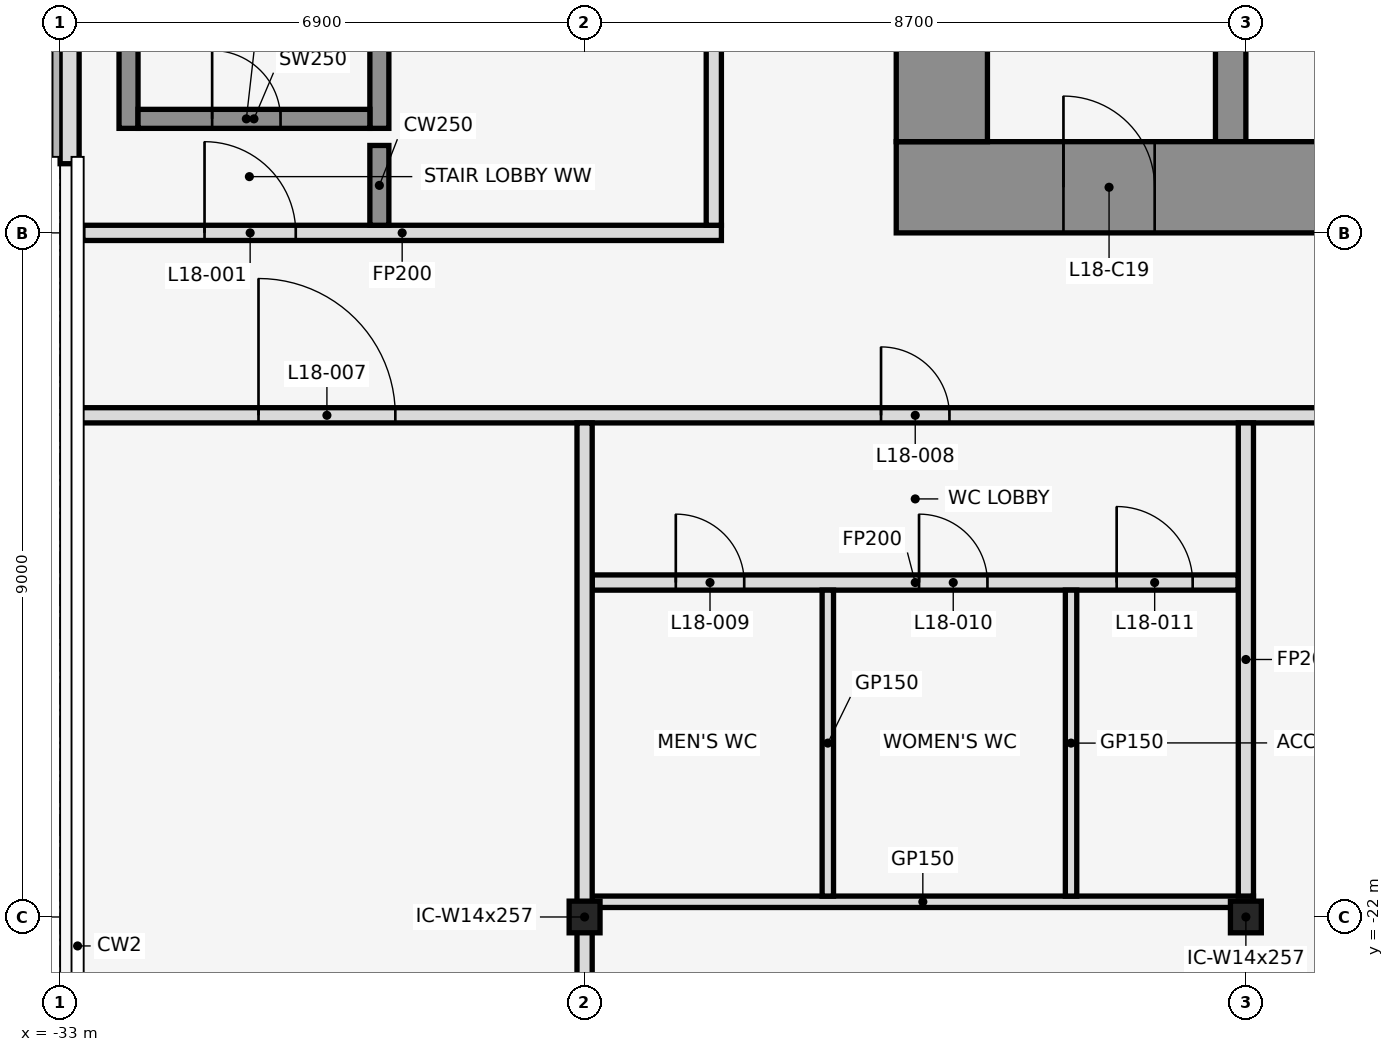
"""IFC4 building model, lengths in metres.
Left out: names, types, materials, properties, quantities, classifications, styles, units other than length and angle.
Written with IfcOpenShell. Run it as: python <this file> out.ifc"""

import sys

from ifc_helpers import new_model, si_unit, direction, frame, frame_2d, origin, origin_2d, place, context, subcontext, project, spatial, rectangle, i_section, extrude, element, fill, save


model = new_model("IFC4")
c1 = context("Model", 3, precision=1e-05, world=origin(), true_north=direction((0.0, 1.0)))
c2 = subcontext(c1, "Body", "Model", "MODEL_VIEW")
j1 = project(units=[si_unit("LENGTHUNIT", "METRE"), si_unit("PLANEANGLEUNIT", "RADIAN")], contexts=[c1])
p1 = place(None, origin())
s1 = spatial("IfcSite", under=j1, at=p1, CompositionType="ELEMENT")
p2 = place(p1, origin())
s2 = spatial("IfcBuilding", under=s1, at=p2, CompositionType="ELEMENT")
p3 = place(p2, frame((0.0, 0.0, 89.9)))
s3 = spatial("IfcBuildingStorey", under=s2, at=p3, CompositionType="ELEMENT", Elevation=89.9)
for number, where, z_axis, x_axis in (
    (1, (-26.1, -22.0, 0.0), (0.0, 0.0, 1.0), (1.0, 0.0, 0.0)),
    (2, (-17.4, -22.0, 0.0), (0.0, 0.0, 1.0), (1.0, 0.0, 0.0)),
):
    element("IfcColumn", number, at=place(p3, frame(where, z_axis=z_axis, x_axis=x_axis)), inside=s3, PredefinedType="COLUMN", context=c2, shape_type="SweptSolid", body=[
        extrude(i_section(OverallWidth=0.406, OverallDepth=0.417, WebThickness=0.03, FlangeThickness=0.048, at=origin_2d()), origin(), (0.0, 0.0, 1.0), 4.1),
    ])
p4 = place(p3, frame((-32.875, -6.0, 0.0), z_axis=(0.0, 0.0, 1.0), x_axis=(0.0, -1.0, 0.0)))
e3 = element("IfcWall", 3, at=p4, inside=s3, PredefinedType="STANDARD", context=c2, shape_type="SweptSolid", body=[
    extrude(rectangle(XDim=6.09, YDim=0.25, at=frame_2d((3.045, 0.0))), origin(), (0.0, 0.0, 1.0), 3.95),
])
for number, where, z_axis, x_axis in (
    (4, (-32.1, -11.625, 0.0), (0.0, 0.0, 1.0), (0.0, 1.0, 0.0)),
    (5, (-28.8, -11.625, 0.0), (0.0, 0.0, 1.0), (0.0, 1.0, 0.0)),
):
    element("IfcWall", number, at=place(p3, frame(where, z_axis=z_axis, x_axis=x_axis)), inside=s3, PredefinedType="SHEAR", context=c2, shape_type="SweptSolid", body=[
        extrude(rectangle(XDim=7.25, YDim=0.25, at=frame_2d((3.625, 0.0))), origin(), (0.0, 0.0, 1.0), 4.1),
    ])
p5 = place(p3, frame((-31.975, -11.5, 0.0), z_axis=(0.0, 0.0, 1.0), x_axis=(1.0, 0.0, 0.0)))
e6 = element("IfcWall", 6, at=p5, inside=s3, PredefinedType="SHEAR", context=c2, shape_type="SweptSolid", body=[
    extrude(rectangle(XDim=3.05, YDim=0.25, at=frame_2d((1.525, 0.0))), origin(), (0.0, 0.0, 1.0), 4.1),
])
p6 = place(p5, frame((0.975, 0.0, 0.0)))
e7 = element("IfcOpeningElement", 7, at=p6, cuts=e6, PredefinedType="OPENING", context=c2, shape_type="SweptSolid", body=[
    extrude(rectangle(XDim=0.9, YDim=2.1, at=frame_2d((0.45, 1.05))), frame((0.0, 0.137, 0.0), z_axis=(0.0, -1.0, 0.0), x_axis=(1.0, 0.0, 0.0)), (0.0, 0.0, 1.0), 0.274),
])
p7 = place(p3, frame((-26.0, -21.8, 0.0), z_axis=(0.0, 0.0, 1.0), x_axis=(1.0, 0.0, 0.0)))
e8 = element("IfcWall", 8, at=p7, inside=s3, PredefinedType="PARTITIONING", context=c2, shape_type="SweptSolid", body=[
    extrude(rectangle(XDim=8.7, YDim=0.15, at=frame_2d((4.35, 0.0))), origin(), (0.0, 0.0, 1.0), 3.018),
])
p8 = place(p3, frame((-26.0, -17.6, 0.0), z_axis=(0.0, 0.0, 1.0), x_axis=(1.0, 0.0, 0.0)))
e9 = element("IfcWall", 9, at=p8, inside=s3, PredefinedType="PARTITIONING", context=c2, shape_type="SweptSolid", body=[
    extrude(rectangle(XDim=8.5, YDim=0.2, at=frame_2d((4.25, 0.0))), origin(), (0.0, 0.0, 1.0), 3.018),
])
p9 = place(p8, frame((1.1, 0.0, 0.0)))
e10 = element("IfcOpeningElement", 10, at=p9, cuts=e9, PredefinedType="OPENING", context=c2, shape_type="SweptSolid", body=[
    extrude(rectangle(XDim=0.9, YDim=2.1, at=frame_2d((0.45, 1.05))), frame((0.0, 0.112, 0.0), z_axis=(0.0, -1.0, 0.0), x_axis=(1.0, 0.0, 0.0)), (0.0, 0.0, 1.0), 0.224),
])
p10 = place(p8, frame((4.3, 0.0, 0.0)))
e11 = element("IfcOpeningElement", 11, at=p10, cuts=e9, PredefinedType="OPENING", context=c2, shape_type="SweptSolid", body=[
    extrude(rectangle(XDim=0.9, YDim=2.1, at=frame_2d((0.45, 1.05))), frame((0.0, 0.112, 0.0), z_axis=(0.0, -1.0, 0.0), x_axis=(1.0, 0.0, 0.0)), (0.0, 0.0, 1.0), 0.224),
])
p11 = place(p8, frame((6.9, 0.0, 0.0)))
e12 = element("IfcOpeningElement", 12, at=p11, cuts=e9, PredefinedType="OPENING", context=c2, shape_type="SweptSolid", body=[
    extrude(rectangle(XDim=1.0, YDim=2.1, at=frame_2d((0.5, 1.05))), frame((0.0, 0.112, 0.0), z_axis=(0.0, -1.0, 0.0), x_axis=(1.0, 0.0, 0.0)), (0.0, 0.0, 1.0), 0.224),
])
p12 = place(p3, frame((-32.79, -15.4, 0.0), z_axis=(0.0, 0.0, 1.0), x_axis=(1.0, 0.0, 0.0)))
e13 = element("IfcWall", 13, at=p12, inside=s3, PredefinedType="PARTITIONING", context=c2, shape_type="SweptSolid", body=[
    extrude(rectangle(XDim=65.58, YDim=0.2, at=frame_2d((32.79, 0.0))), origin(), (0.0, 0.0, 1.0), 3.018),
])
p13 = place(p12, frame((2.4, 0.0, 0.0)))
e14 = element("IfcOpeningElement", 14, at=p13, cuts=e13, PredefinedType="OPENING", context=c2, shape_type="SweptSolid", body=[
    extrude(rectangle(XDim=1.8, YDim=2.1, at=frame_2d((0.9, 1.05))), frame((0.0, 0.112, 0.0), z_axis=(0.0, -1.0, 0.0), x_axis=(1.0, 0.0, 0.0)), (0.0, 0.0, 1.0), 0.224),
])
p14 = place(p12, frame((10.59, 0.0, 0.0)))
e15 = element("IfcOpeningElement", 15, at=p14, cuts=e13, PredefinedType="OPENING", context=c2, shape_type="SweptSolid", body=[
    extrude(rectangle(XDim=0.9, YDim=2.1, at=frame_2d((0.45, 1.05))), frame((0.0, 0.112, 0.0), z_axis=(0.0, -1.0, 0.0), x_axis=(1.0, 0.0, 0.0)), (0.0, 0.0, 1.0), 0.224),
])
p15 = place(p12, frame((17.39, 0.0, 0.0)))
e16 = element("IfcOpeningElement", 16, at=p15, cuts=e13, PredefinedType="OPENING", context=c2, shape_type="SweptSolid", body=[
    extrude(rectangle(XDim=1.8, YDim=2.1, at=frame_2d((0.9, 1.05))), frame((0.0, 0.112, 0.0), z_axis=(0.0, -1.0, 0.0), x_axis=(1.0, 0.0, 0.0)), (0.0, 0.0, 1.0), 0.224),
])
p16 = place(p12, frame((24.59, 0.0, 0.0)))
e17 = element("IfcOpeningElement", 17, at=p16, cuts=e13, PredefinedType="OPENING", context=c2, shape_type="SweptSolid", body=[
    extrude(rectangle(XDim=1.8, YDim=2.1, at=frame_2d((0.9, 1.05))), frame((0.0, 0.112, 0.0), z_axis=(0.0, -1.0, 0.0), x_axis=(1.0, 0.0, 0.0)), (0.0, 0.0, 1.0), 0.224),
])
p17 = place(p12, frame((34.79, 0.0, 0.0)))
e18 = element("IfcOpeningElement", 18, at=p17, cuts=e13, PredefinedType="OPENING", context=c2, shape_type="SweptSolid", body=[
    extrude(rectangle(XDim=1.8, YDim=2.1, at=frame_2d((0.9, 1.05))), frame((0.0, 0.112, 0.0), z_axis=(0.0, -1.0, 0.0), x_axis=(1.0, 0.0, 0.0)), (0.0, 0.0, 1.0), 0.224),
])
p18 = place(p12, frame((43.49, 0.0, 0.0)))
e19 = element("IfcOpeningElement", 19, at=p18, cuts=e13, PredefinedType="OPENING", context=c2, shape_type="SweptSolid", body=[
    extrude(rectangle(XDim=1.8, YDim=2.1, at=frame_2d((0.9, 1.05))), frame((0.0, 0.112, 0.0), z_axis=(0.0, -1.0, 0.0), x_axis=(1.0, 0.0, 0.0)), (0.0, 0.0, 1.0), 0.224),
])
p19 = place(p12, frame((49.69, 0.0, 0.0)))
e20 = element("IfcOpeningElement", 20, at=p19, cuts=e13, PredefinedType="OPENING", context=c2, shape_type="SweptSolid", body=[
    extrude(rectangle(XDim=1.0, YDim=2.1, at=frame_2d((0.5, 1.05))), frame((0.0, 0.112, 0.0), z_axis=(0.0, -1.0, 0.0), x_axis=(1.0, 0.0, 0.0)), (0.0, 0.0, 1.0), 0.224),
])
p20 = place(p12, frame((55.49, 0.0, 0.0)))
e21 = element("IfcOpeningElement", 21, at=p20, cuts=e13, PredefinedType="OPENING", context=c2, shape_type="SweptSolid", body=[
    extrude(rectangle(XDim=1.0, YDim=2.1, at=frame_2d((0.5, 1.05))), frame((0.0, 0.112, 0.0), z_axis=(0.0, -1.0, 0.0), x_axis=(1.0, 0.0, 0.0)), (0.0, 0.0, 1.0), 0.224),
])
p21 = place(p12, frame((61.29, 0.0, 0.0)))
e22 = element("IfcOpeningElement", 22, at=p21, cuts=e13, PredefinedType="OPENING", context=c2, shape_type="SweptSolid", body=[
    extrude(rectangle(XDim=1.8, YDim=2.1, at=frame_2d((0.9, 1.05))), frame((0.0, 0.112, 0.0), z_axis=(0.0, -1.0, 0.0), x_axis=(1.0, 0.0, 0.0)), (0.0, 0.0, 1.0), 0.224),
])
p22 = place(p3, frame((-32.7, -13.0, 0.0), z_axis=(0.0, 0.0, 1.0), x_axis=(1.0, 0.0, 0.0)))
e23 = element("IfcWall", 23, at=p22, inside=s3, PredefinedType="PARTITIONING", context=c2, shape_type="SweptSolid", body=[
    extrude(rectangle(XDim=8.4, YDim=0.2, at=frame_2d((4.2, 0.0))), origin(), (0.0, 0.0, 1.0), 3.018),
])
p23 = place(p22, frame((1.6, 0.0, 0.0)))
e24 = element("IfcOpeningElement", 24, at=p23, cuts=e23, PredefinedType="OPENING", context=c2, shape_type="SweptSolid", body=[
    extrude(rectangle(XDim=1.2, YDim=2.1, at=frame_2d((0.6, 1.05))), frame((0.0, 0.112, 0.0), z_axis=(0.0, -1.0, 0.0), x_axis=(1.0, 0.0, 0.0)), (0.0, 0.0, 1.0), 0.224),
])
p24 = place(p3, frame((-28.8, -12.9, 0.0), z_axis=(0.0, 0.0, 1.0), x_axis=(0.0, 1.0, 0.0)))
e25 = element("IfcWall", 25, at=p24, inside=s3, PredefinedType="SHEAR", context=c2, shape_type="SweptSolid", body=[
    extrude(rectangle(XDim=1.05, YDim=0.25, at=frame_2d((0.525, 0.0))), origin(), (0.0, 0.0, 1.0), 4.1),
])
p25 = place(p3, frame((-26.1, -35.86, 0.0), z_axis=(0.0, 0.0, 1.0), x_axis=(0.0, 1.0, 0.0)))
e26 = element("IfcWall", 26, at=p25, inside=s3, PredefinedType="PARTITIONING", context=c2, shape_type="SweptSolid", body=[
    extrude(rectangle(XDim=20.36, YDim=0.2, at=frame_2d((10.18, 0.0))), origin(), (0.0, 0.0, 1.0), 3.018),
])
p26 = place(p3, frame((-24.4, -12.9, 0.0), z_axis=(0.0, 0.0, 1.0), x_axis=(0.0, 1.0, 0.0)))
e27 = element("IfcWall", 27, at=p26, inside=s3, PredefinedType="PARTITIONING", context=c2, shape_type="SweptSolid", body=[
    extrude(rectangle(XDim=9.69, YDim=0.2, at=frame_2d((4.845, 0.0))), origin(), (0.0, 0.0, 1.0), 3.018),
])
p27 = place(p26, frame((4.4, 0.0, 0.0)))
e28 = element("IfcOpeningElement", 28, at=p27, cuts=e27, PredefinedType="OPENING", context=c2, shape_type="SweptSolid", body=[
    extrude(rectangle(XDim=1.0, YDim=2.1, at=frame_2d((0.5, 1.05))), frame((0.0, 0.112, 0.0), z_axis=(0.0, -1.0, 0.0), x_axis=(1.0, 0.0, 0.0)), (0.0, 0.0, 1.0), 0.224),
])
for number, where, z_axis, x_axis in (
    (29, (-22.9, -21.725, 0.0), (0.0, 0.0, 1.0), (0.0, 1.0, 0.0)),
    (30, (-19.7, -21.725, 0.0), (0.0, 0.0, 1.0), (0.0, 1.0, 0.0)),
):
    element("IfcWall", number, at=place(p3, frame(where, z_axis=z_axis, x_axis=x_axis)), inside=s3, PredefinedType="PARTITIONING", context=c2, shape_type="SweptSolid", body=[
        extrude(rectangle(XDim=4.025, YDim=0.15, at=frame_2d((2.013, 0.0))), origin(), (0.0, 0.0, 1.0), 3.018),
    ])
p28 = place(p3, frame((-17.4, -21.725, 0.0), z_axis=(0.0, 0.0, 1.0), x_axis=(0.0, 1.0, 0.0)))
e31 = element("IfcWall", 31, at=p28, inside=s3, PredefinedType="PARTITIONING", context=c2, shape_type="SweptSolid", body=[
    extrude(rectangle(XDim=6.225, YDim=0.2, at=frame_2d((3.113, 0.0))), origin(), (0.0, 0.0, 1.0), 3.018),
])
p29 = place(p3, frame((-17.6, -11.8, 0.0), z_axis=(0.0, 0.0, 1.0), x_axis=(0.0, 1.0, 0.0)))
e32 = element("IfcWall", 32, at=p29, inside=s3, PredefinedType="SHEAR", context=c2, shape_type="SweptSolid", body=[
    extrude(rectangle(XDim=10.6, YDim=0.4, at=frame_2d((5.3, 0.0))), origin(), (0.0, 0.0, 1.0), 4.1),
])
p30 = place(p29, frame((1.25, 0.0, 0.0)))
e33 = element("IfcOpeningElement", 33, at=p30, cuts=e32, PredefinedType="OPENING", context=c2, shape_type="SweptSolid", body=[
    extrude(rectangle(XDim=1.1, YDim=2.1, at=frame_2d((0.55, 1.05))), frame((0.0, 0.212, 0.0), z_axis=(0.0, -1.0, 0.0), x_axis=(1.0, 0.0, 0.0)), (0.0, 0.0, 1.0), 0.424),
])
p31 = place(p29, frame((3.95, 0.0, 0.0)))
e34 = element("IfcOpeningElement", 34, at=p31, cuts=e32, PredefinedType="OPENING", context=c2, shape_type="SweptSolid", body=[
    extrude(rectangle(XDim=1.1, YDim=2.1, at=frame_2d((0.55, 1.05))), frame((0.0, 0.212, 0.0), z_axis=(0.0, -1.0, 0.0), x_axis=(1.0, 0.0, 0.0)), (0.0, 0.0, 1.0), 0.424),
])
p32 = place(p3, frame((-22.0, -12.4, 0.0), z_axis=(0.0, 0.0, 1.0), x_axis=(1.0, 0.0, 0.0)))
e35 = element("IfcWall", 35, at=p32, inside=s3, PredefinedType="SHEAR", context=c2, shape_type="SweptSolid", body=[
    extrude(rectangle(XDim=44.0, YDim=1.2, at=frame_2d((22.0, 0.0))), origin(), (0.0, 0.0, 1.0), 4.1),
])
p33 = place(p32, frame((2.2, 0.0, 0.0)))
e36 = element("IfcOpeningElement", 36, at=p33, cuts=e35, PredefinedType="OPENING", context=c2, shape_type="SweptSolid", body=[
    extrude(rectangle(XDim=1.2, YDim=2.1, at=frame_2d((0.6, 1.05))), frame((0.0, 0.612, 0.0), z_axis=(0.0, -1.0, 0.0), x_axis=(1.0, 0.0, 0.0)), (0.0, 0.0, 1.0), 1.224),
])
p34 = place(p32, frame((21.4, 0.0, 0.0)))
e37 = element("IfcOpeningElement", 37, at=p34, cuts=e35, PredefinedType="OPENING", context=c2, shape_type="SweptSolid", body=[
    extrude(rectangle(XDim=1.2, YDim=2.1, at=frame_2d((0.6, 1.05))), frame((0.0, 0.612, 0.0), z_axis=(0.0, -1.0, 0.0), x_axis=(1.0, 0.0, 0.0)), (0.0, 0.0, 1.0), 1.224),
])
p35 = place(p32, frame((40.6, 0.0, 0.0)))
e38 = element("IfcOpeningElement", 38, at=p35, cuts=e35, PredefinedType="OPENING", context=c2, shape_type="SweptSolid", body=[
    extrude(rectangle(XDim=1.2, YDim=2.1, at=frame_2d((0.6, 1.05))), frame((0.0, 0.612, 0.0), z_axis=(0.0, -1.0, 0.0), x_axis=(1.0, 0.0, 0.0)), (0.0, 0.0, 1.0), 1.224),
])
p36 = place(p32, frame((16.0, 0.0, 0.0)))
e39 = element("IfcOpeningElement", 39, at=p36, cuts=e35, PredefinedType="OPENING", context=c2, shape_type="SweptSolid", body=[
    extrude(rectangle(XDim=1.8, YDim=2.1, at=frame_2d((0.9, 1.05))), frame((0.0, 0.612, 0.0), z_axis=(0.0, -1.0, 0.0), x_axis=(1.0, 0.0, 0.0)), (0.0, 0.0, 1.0), 1.224),
])
p37 = place(p32, frame((6.3, 0.0, 0.0)))
e40 = element("IfcOpeningElement", 40, at=p37, cuts=e35, PredefinedType="OPENING", context=c2, shape_type="SweptSolid", body=[
    extrude(rectangle(XDim=1.2, YDim=2.1, at=frame_2d((0.6, 1.05))), frame((0.0, 0.612, 0.0), z_axis=(0.0, -1.0, 0.0), x_axis=(1.0, 0.0, 0.0)), (0.0, 0.0, 1.0), 1.224),
])
p38 = place(p32, frame((26.2, 0.0, 0.0)))
e41 = element("IfcOpeningElement", 41, at=p38, cuts=e35, PredefinedType="OPENING", context=c2, shape_type="SweptSolid", body=[
    extrude(rectangle(XDim=1.8, YDim=2.1, at=frame_2d((0.9, 1.05))), frame((0.0, 0.612, 0.0), z_axis=(0.0, -1.0, 0.0), x_axis=(1.0, 0.0, 0.0)), (0.0, 0.0, 1.0), 1.224),
])
p39 = place(p32, frame((36.5, 0.0, 0.0)))
e42 = element("IfcOpeningElement", 42, at=p39, cuts=e35, PredefinedType="OPENING", context=c2, shape_type="SweptSolid", body=[
    extrude(rectangle(XDim=1.2, YDim=2.1, at=frame_2d((0.6, 1.05))), frame((0.0, 0.612, 0.0), z_axis=(0.0, -1.0, 0.0), x_axis=(1.0, 0.0, 0.0)), (0.0, 0.0, 1.0), 1.224),
])
p40 = place(p3, frame((-21.4, -11.8, 0.0), z_axis=(0.0, 0.0, 1.0), x_axis=(0.0, 1.0, 0.0)))
e43 = element("IfcWall", 43, at=p40, inside=s3, PredefinedType="SHEAR", context=c2, shape_type="SweptSolid", body=[
    extrude(rectangle(XDim=10.6, YDim=1.2, at=frame_2d((5.3, 0.0))), origin(), (0.0, 0.0, 1.0), 4.1),
])
p41 = place(p23, origin())
e44 = element("IfcDoor", 44, at=p41, inside=s3, OperationType="SINGLE_SWING_LEFT", PredefinedType="DOOR", context=c2, shape_type="SweptSolid", body=[
    extrude(rectangle(XDim=1.2, YDim=2.1, at=frame_2d((0.6, 1.05))), frame((0.0, 0.025, 0.0), z_axis=(0.0, -1.0, 0.0), x_axis=(1.0, 0.0, 0.0)), (0.0, 0.0, 1.0), 0.05),
])
fill(e24, e44)
p42 = place(p6, origin())
e45 = element("IfcDoor", 45, at=p42, inside=s3, OperationType="SINGLE_SWING_LEFT", PredefinedType="DOOR", context=c2, shape_type="SweptSolid", body=[
    extrude(rectangle(XDim=0.9, YDim=2.1, at=frame_2d((0.45, 1.05))), frame((0.0, 0.025, 0.0), z_axis=(0.0, -1.0, 0.0), x_axis=(1.0, 0.0, 0.0)), (0.0, 0.0, 1.0), 0.05),
])
fill(e7, e45)
p43 = place(p13, origin())
e46 = element("IfcDoor", 46, at=p43, inside=s3, OperationType="SINGLE_SWING_LEFT", PredefinedType="DOOR", context=c2, shape_type="SweptSolid", body=[
    extrude(rectangle(XDim=1.8, YDim=2.1, at=frame_2d((0.9, 1.05))), frame((0.0, 0.025, 0.0), z_axis=(0.0, -1.0, 0.0), x_axis=(1.0, 0.0, 0.0)), (0.0, 0.0, 1.0), 0.05),
])
fill(e14, e46)
p44 = place(p14, frame((0.9, 0.0, 0.0), z_axis=(0.0, 0.0, 1.0), x_axis=(-1.0, 0.0, 0.0)))
e47 = element("IfcDoor", 47, at=p44, inside=s3, OperationType="SINGLE_SWING_RIGHT", PredefinedType="DOOR", context=c2, shape_type="SweptSolid", body=[
    extrude(rectangle(XDim=0.9, YDim=2.1, at=frame_2d((0.45, 1.05))), frame((0.0, 0.025, 0.0), z_axis=(0.0, -1.0, 0.0), x_axis=(1.0, 0.0, 0.0)), (0.0, 0.0, 1.0), 0.05),
])
fill(e15, e47)
p45 = place(p9, frame((0.9, 0.0, 0.0), z_axis=(0.0, 0.0, 1.0), x_axis=(-1.0, 0.0, 0.0)))
e48 = element("IfcDoor", 48, at=p45, inside=s3, OperationType="SINGLE_SWING_RIGHT", PredefinedType="DOOR", context=c2, shape_type="SweptSolid", body=[
    extrude(rectangle(XDim=0.9, YDim=2.1, at=frame_2d((0.45, 1.05))), frame((0.0, 0.025, 0.0), z_axis=(0.0, -1.0, 0.0), x_axis=(1.0, 0.0, 0.0)), (0.0, 0.0, 1.0), 0.05),
])
fill(e10, e48)
p46 = place(p10, frame((0.9, 0.0, 0.0), z_axis=(0.0, 0.0, 1.0), x_axis=(-1.0, 0.0, 0.0)))
e49 = element("IfcDoor", 49, at=p46, inside=s3, OperationType="SINGLE_SWING_LEFT", PredefinedType="DOOR", context=c2, shape_type="SweptSolid", body=[
    extrude(rectangle(XDim=0.9, YDim=2.1, at=frame_2d((0.45, 1.05))), frame((0.0, 0.025, 0.0), z_axis=(0.0, -1.0, 0.0), x_axis=(1.0, 0.0, 0.0)), (0.0, 0.0, 1.0), 0.05),
])
fill(e11, e49)
p47 = place(p11, frame((1.0, 0.0, 0.0), z_axis=(0.0, 0.0, 1.0), x_axis=(-1.0, 0.0, 0.0)))
e50 = element("IfcDoor", 50, at=p47, inside=s3, OperationType="SINGLE_SWING_RIGHT", PredefinedType="DOOR", context=c2, shape_type="SweptSolid", body=[
    extrude(rectangle(XDim=1.0, YDim=2.1, at=frame_2d((0.5, 1.05))), frame((0.0, 0.025, 0.0), z_axis=(0.0, -1.0, 0.0), x_axis=(1.0, 0.0, 0.0)), (0.0, 0.0, 1.0), 0.05),
])
fill(e12, e50)
p48 = place(p33, frame((1.2, 0.0, 0.0), z_axis=(0.0, 0.0, 1.0), x_axis=(-1.0, 0.0, 0.0)))
e51 = element("IfcDoor", 51, at=p48, inside=s3, OperationType="SINGLE_SWING_RIGHT", PredefinedType="DOOR", context=c2, shape_type="SweptSolid", body=[
    extrude(rectangle(XDim=1.2, YDim=2.1, at=frame_2d((0.6, 1.05))), frame((0.0, 0.025, 0.0), z_axis=(0.0, -1.0, 0.0), x_axis=(1.0, 0.0, 0.0)), (0.0, 0.0, 1.0), 0.05),
])
fill(e36, e51)
save(model, sys.argv[1])
